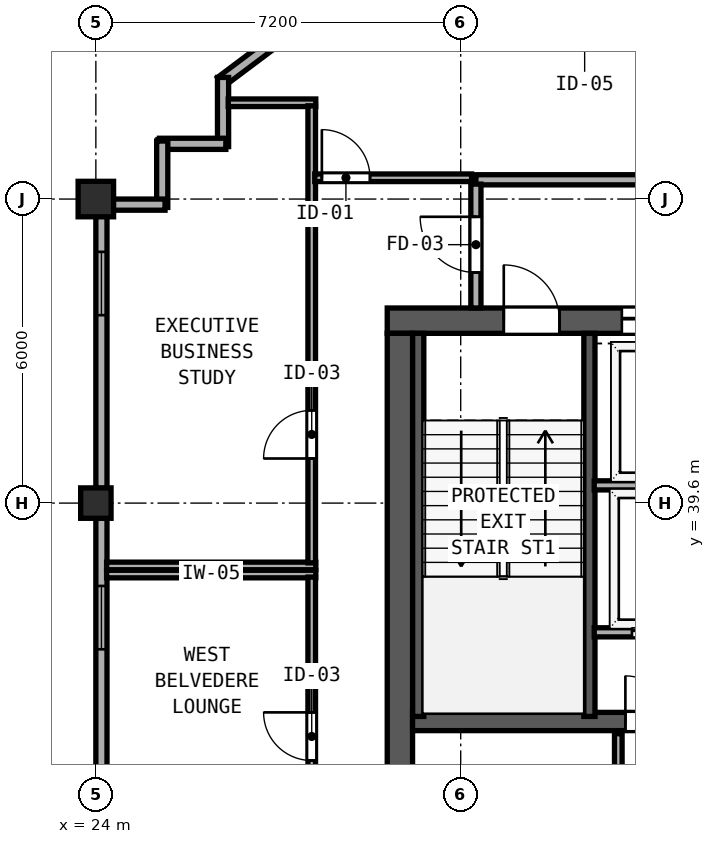
"""IFC4 building model, lengths in metres.
Left out: names, types, materials, properties, quantities, classifications, styles, units other than length and angle.
Written with IfcOpenShell. Run it as: python <this file> out.ifc"""

import sys

from ifc_helpers import new_model, si_unit, direction, frame, frame_2d, origin, origin_2d, place, context, subcontext, project, spatial, rectangle, hollow_rectangle, extrude, element, fill, save


model = new_model("IFC4")
c1 = context("Model", 3, precision=1e-05, world=origin(), true_north=direction((0.0, 1.0)))
c2 = subcontext(c1, "Body", "Model", "MODEL_VIEW")
j1 = project(units=[si_unit("LENGTHUNIT", "METRE"), si_unit("PLANEANGLEUNIT", "RADIAN")], contexts=[c1])
p1 = place(None, origin())
s1 = spatial("IfcSite", under=j1, at=p1, CompositionType="ELEMENT")
p2 = place(p1, origin())
s2 = spatial("IfcBuilding", under=s1, at=p2, CompositionType="ELEMENT")
p3 = place(p2, frame((0.0, 0.0, 301.7)))
s3 = spatial("IfcBuildingStorey", under=s2, at=p3, CompositionType="ELEMENT", Elevation=301.7)
p4 = place(p3, frame((29.75, 43.2, 0.0), z_axis=(0.0, 0.0, 1.0), x_axis=(1.0, 0.0, 0.0)))
e1 = element("IfcWall", 1, at=p4, inside=s3, PredefinedType="SHEAR", context=c2, shape_type="SweptSolid", body=[
    extrude(rectangle(XDim=17.3, YDim=0.5, at=frame_2d((8.65, 0.0))), origin(), (0.0, 0.0, 1.0), 3.72),
])
p5 = place(p4, frame((2.3, 0.0, 0.0)))
e2 = element("IfcOpeningElement", 2, at=p5, cuts=e1, PredefinedType="OPENING", context=c2, shape_type="SweptSolid", body=[
    extrude(rectangle(XDim=1.1, YDim=2.15, at=frame_2d((0.55, 1.075))), frame((0.0, 0.26, 0.0), z_axis=(0.0, -1.0, 0.0), x_axis=(1.0, 0.0, 0.0)), (0.0, 0.0, 1.0), 0.52),
])
p6 = place(p4, frame((7.41, 0.0, 0.0)))
e3 = element("IfcOpeningElement", 3, at=p6, cuts=e1, PredefinedType="OPENING", context=c2, shape_type="SweptSolid", body=[
    extrude(rectangle(XDim=1.1, YDim=2.15, at=frame_2d((0.55, 1.075))), frame((0.0, 0.26, 0.0), z_axis=(0.0, -1.0, 0.0), x_axis=(1.0, 0.0, 0.0)), (0.0, 0.0, 1.0), 0.52),
])
p7 = place(p4, frame((13.5, 0.0, 0.0)))
e4 = element("IfcOpeningElement", 4, at=p7, cuts=e1, PredefinedType="OPENING", context=c2, shape_type="SweptSolid", body=[
    extrude(rectangle(XDim=1.1, YDim=2.15, at=frame_2d((0.55, 1.075))), frame((0.0, 0.26, 0.0), z_axis=(0.0, -1.0, 0.0), x_axis=(1.0, 0.0, 0.0)), (0.0, 0.0, 1.0), 0.52),
])
p8 = place(p4, frame((4.63, 0.0, 0.0)))
e5 = element("IfcOpeningElement", 5, at=p8, cuts=e1, PredefinedType="OPENING", context=c2, shape_type="SweptSolid", body=[
    extrude(rectangle(XDim=1.1, YDim=2.2, at=frame_2d((0.55, 1.1))), frame((0.0, 0.26, 0.0), z_axis=(0.0, -1.0, 0.0), x_axis=(1.0, 0.0, 0.0)), (0.0, 0.0, 1.0), 0.52),
])
p9 = place(p4, frame((10.99, 0.0, 0.0)))
e6 = element("IfcOpeningElement", 6, at=p9, cuts=e1, PredefinedType="OPENING", context=c2, shape_type="SweptSolid", body=[
    extrude(rectangle(XDim=1.1, YDim=2.2, at=frame_2d((0.55, 1.1))), frame((0.0, 0.26, 0.0), z_axis=(0.0, -1.0, 0.0), x_axis=(1.0, 0.0, 0.0)), (0.0, 0.0, 1.0), 0.52),
])
p10 = place(p3, frame((30.0, 32.8, 0.0), z_axis=(0.0, 0.0, 1.0), x_axis=(0.0, 1.0, 0.0)))
e7 = element("IfcWall", 7, at=p10, inside=s3, PredefinedType="SHEAR", context=c2, shape_type="SweptSolid", body=[
    extrude(rectangle(XDim=10.15, YDim=0.5, at=frame_2d((5.075, 0.0))), origin(), (0.0, 0.0, 1.0), 3.72),
])
p11 = place(p3, frame((30.25, 35.29, 0.0), z_axis=(0.0, 0.0, 1.0), x_axis=(1.0, 0.0, 0.0)))
e8 = element("IfcWall", 8, at=p11, inside=s3, PredefinedType="SHEAR", context=c2, shape_type="SweptSolid", body=[
    extrude(rectangle(XDim=16.3, YDim=0.36, at=frame_2d((8.15, 0.0))), origin(), (0.0, 0.0, 1.0), 3.72),
])
p12 = place(p11, frame((5.1, 0.0, 0.0), z_axis=(0.0, 0.0, 1.0), x_axis=(-1.0, 0.0, 0.0)))
e9 = element("IfcOpeningElement", 9, at=p12, cuts=e8, PredefinedType="OPENING", context=c2, shape_type="SweptSolid", body=[
    extrude(rectangle(XDim=0.9, YDim=2.1, at=frame_2d((0.45, 1.05))), frame((0.0, 0.19, 0.0), z_axis=(0.0, -1.0, 0.0), x_axis=(1.0, 0.0, 0.0)), (0.0, 0.0, 1.0), 0.38),
])
p13 = place(p11, frame((12.16, 0.0, 0.0), z_axis=(0.0, 0.0, 1.0), x_axis=(-1.0, 0.0, 0.0)))
e10 = element("IfcOpeningElement", 10, at=p13, cuts=e8, PredefinedType="OPENING", context=c2, shape_type="SweptSolid", body=[
    extrude(rectangle(XDim=0.9, YDim=2.1, at=frame_2d((0.45, 1.05))), frame((0.0, 0.19, 0.0), z_axis=(0.0, -1.0, 0.0), x_axis=(1.0, 0.0, 0.0)), (0.0, 0.0, 1.0), 0.38),
])
for number, where, z_axis, x_axis in (
    (11, (30.362, 35.39, 0.0), (0.0, 0.0, 1.0), (0.0, 1.0, 0.0)),
    (12, (33.74, 35.39, 0.0), (0.0, 0.0, 1.0), (0.0, 1.0, 0.0)),
):
    element("IfcWall", number, at=place(p3, frame(where, z_axis=z_axis, x_axis=x_axis)), inside=s3, PredefinedType="SHEAR", context=c2, shape_type="SweptSolid", body=[
        extrude(rectangle(XDim=7.56, YDim=0.22, at=frame_2d((3.78, 0.0))), origin(), (0.0, 0.0, 1.0), 3.72),
    ])
p14 = place(p3, frame((24.0, 45.6, 0.0), z_axis=(0.0, 0.0, 1.0), x_axis=(1.0, 0.0, 0.0)))
e13 = element("IfcColumn", 13, at=p14, inside=s3, PredefinedType="COLUMN", context=c2, shape_type="SweptSolid", body=[
    extrude(hollow_rectangle(XDim=0.7, YDim=0.7, WallThickness=0.026, at=origin_2d()), origin(), (0.0, 0.0, 1.0), 3.9),
])
p15 = place(p3, frame((24.0, 39.6, 0.0), z_axis=(0.0, 0.0, 1.0), x_axis=(1.0, 0.0, 0.0)))
e14 = element("IfcColumn", 14, at=p15, inside=s3, PredefinedType="COLUMN", context=c2, shape_type="SweptSolid", body=[
    extrude(hollow_rectangle(XDim=0.6, YDim=0.6, WallThickness=0.024, at=origin_2d()), origin(), (0.0, 0.0, 1.0), 3.9),
])
p16 = place(p3, frame((31.289, 51.529, 0.0), z_axis=(0.0, 0.0, 1.0), x_axis=(-0.800014580093, -0.599980559383, 0.0)))
e15 = element("IfcWall", 15, at=p16, inside=s3, PredefinedType="SOLIDWALL", context=c2, shape_type="SweptSolid", body=[
    extrude(rectangle(XDim=6.028, YDim=0.22, at=frame_2d((3.014, 0.0))), origin(), (0.0, 0.0, 1.0), 3.72),
])
p17 = place(p16, frame((0.7, 0.0, 0.85)))
e16 = element("IfcOpeningElement", 16, at=p17, cuts=e15, PredefinedType="OPENING", context=c2, shape_type="SweptSolid", body=[
    extrude(rectangle(XDim=1.25, YDim=1.95, at=frame_2d((0.625, 0.975))), frame((0.0, 0.12, 0.0), z_axis=(0.0, -1.0, 0.0), x_axis=(1.0, 0.0, 0.0)), (0.0, 0.0, 1.0), 0.24),
])
p18 = place(p3, frame((26.51, 48.0, 0.0), z_axis=(0.0, 0.0, 1.0), x_axis=(0.0, -1.0, 0.0)))
e17 = element("IfcWall", 17, at=p18, inside=s3, PredefinedType="SOLIDWALL", context=c2, shape_type="SweptSolid", body=[
    extrude(rectangle(XDim=1.365, YDim=0.22, at=frame_2d((0.683, 0.0))), origin(), (0.0, 0.0, 1.0), 3.72),
])
for number, where, z_axis, x_axis in (
    (18, (26.565, 46.69, 0.0), (0.0, 0.0, 1.0), (-1.0, 0.0, 0.0)),
    (19, (25.31, 46.745, 0.0), (0.0, 0.0, 1.0), (0.0, -1.0, 0.0)),
):
    element("IfcWall", number, at=place(p3, frame(where, z_axis=z_axis, x_axis=x_axis)), inside=s3, PredefinedType="SOLIDWALL", context=c2, shape_type="SweptSolid", body=[
        extrude(rectangle(XDim=1.31, YDim=0.22, at=frame_2d((0.655, 0.0))), origin(), (0.0, 0.0, 1.0), 3.72),
    ])
p19 = place(p3, frame((25.365, 45.49, 0.0), z_axis=(0.0, 0.0, 1.0), x_axis=(-1.0, 0.0, 0.0)))
e20 = element("IfcWall", 20, at=p19, inside=s3, PredefinedType="SOLIDWALL", context=c2, shape_type="SweptSolid", body=[
    extrude(rectangle(XDim=1.023, YDim=0.22, at=frame_2d((0.511, 0.0))), origin(), (0.0, 0.0, 1.0), 3.72),
])
p20 = place(p3, frame((24.11, 45.258, 0.0), z_axis=(0.0, 0.0, 1.0), x_axis=(0.0, -1.0, 0.0)))
e21 = element("IfcWall", 21, at=p20, inside=s3, PredefinedType="SOLIDWALL", context=c2, shape_type="SweptSolid", body=[
    extrude(rectangle(XDim=5.366, YDim=0.22, at=frame_2d((2.683, 0.0))), origin(), (0.0, 0.0, 1.0), 3.365),
])
p21 = place(p20, frame((0.7, 0.0, 0.85)))
e22 = element("IfcOpeningElement", 22, at=p21, cuts=e21, PredefinedType="OPENING", context=c2, shape_type="SweptSolid", body=[
    extrude(rectangle(XDim=1.25, YDim=1.95, at=frame_2d((0.625, 0.975))), frame((0.0, 0.12, 0.0), z_axis=(0.0, -1.0, 0.0), x_axis=(1.0, 0.0, 0.0)), (0.0, 0.0, 1.0), 0.24),
])
p22 = place(p3, frame((24.11, 39.308, 0.0), z_axis=(0.0, 0.0, 1.0), x_axis=(0.0, -1.0, 0.0)))
e23 = element("IfcWall", 23, at=p22, inside=s3, PredefinedType="SOLIDWALL", context=c2, shape_type="SweptSolid", body=[
    extrude(rectangle(XDim=5.366, YDim=0.22, at=frame_2d((2.683, 0.0))), origin(), (0.0, 0.0, 1.0), 3.365),
])
p23 = place(p22, frame((1.343, 0.0, 0.85)))
e24 = element("IfcOpeningElement", 24, at=p23, cuts=e23, PredefinedType="OPENING", context=c2, shape_type="SweptSolid", body=[
    extrude(rectangle(XDim=1.25, YDim=1.95, at=frame_2d((0.625, 0.975))), frame((0.0, 0.12, 0.0), z_axis=(0.0, -1.0, 0.0), x_axis=(1.0, 0.0, 0.0)), (0.0, 0.0, 1.0), 0.24),
])
p24 = place(p3, frame((31.5, 45.98, 0.0), z_axis=(0.0, 0.0, 1.0), x_axis=(1.0, 0.0, 0.0)))
e25 = element("IfcWall", 25, at=p24, inside=s3, PredefinedType="SOLIDWALL", context=c2, shape_type="SweptSolid", body=[
    extrude(rectangle(XDim=13.8, YDim=0.2, at=frame_2d((6.9, 0.0))), origin(), (0.0, 0.0, 1.0), 3.72),
])
p25 = place(p3, frame((31.5, 43.45, 0.0), z_axis=(0.0, 0.0, 1.0), x_axis=(0.0, 1.0, 0.0)))
e26 = element("IfcWall", 26, at=p25, inside=s3, PredefinedType="SOLIDWALL", context=c2, shape_type="SweptSolid", body=[
    extrude(rectangle(XDim=2.445, YDim=0.2, at=frame_2d((1.223, 0.0))), origin(), (0.0, 0.0, 1.0), 3.72),
])
p26 = place(p25, frame((1.8, 0.0, 0.0), z_axis=(0.0, 0.0, 1.0), x_axis=(-1.0, 0.0, 0.0)))
e27 = element("IfcOpeningElement", 27, at=p26, cuts=e26, PredefinedType="OPENING", context=c2, shape_type="SweptSolid", body=[
    extrude(rectangle(XDim=1.1, YDim=2.15, at=frame_2d((0.55, 1.075))), frame((0.0, 0.11, 0.0), z_axis=(0.0, -1.0, 0.0), x_axis=(1.0, 0.0, 0.0)), (0.0, 0.0, 1.0), 0.22),
])
p27 = place(p3, frame((33.835, 39.95, 0.0), z_axis=(0.0, 0.0, 1.0), x_axis=(1.0, 0.0, 0.0)))
e28 = element("IfcWall", 28, at=p27, inside=s3, PredefinedType="SOLIDWALL", context=c2, shape_type="SweptSolid", body=[
    extrude(rectangle(XDim=2.77, YDim=0.18, at=frame_2d((1.385, 0.0))), origin(), (0.0, 0.0, 1.0), 3.72),
])
p28 = place(p3, frame((33.835, 37.05, 0.0), z_axis=(0.0, 0.0, 1.0), x_axis=(1.0, 0.0, 0.0)))
e29 = element("IfcWall", 29, at=p28, inside=s3, PredefinedType="SOLIDWALL", context=c2, shape_type="SweptSolid", body=[
    extrude(rectangle(XDim=2.77, YDim=0.18, at=frame_2d((1.385, 0.0))), origin(), (0.0, 0.0, 1.0), 3.72),
])
p29 = place(p28, frame((1.945, 0.0, 0.0), z_axis=(0.0, 0.0, 1.0), x_axis=(-1.0, 0.0, 0.0)))
e30 = element("IfcOpeningElement", 30, at=p29, cuts=e29, PredefinedType="OPENING", context=c2, shape_type="SweptSolid", body=[
    extrude(rectangle(XDim=1.2, YDim=2.2, at=frame_2d((0.6, 1.1))), frame((0.0, 0.1, 0.0), z_axis=(0.0, -1.0, 0.0), x_axis=(1.0, 0.0, 0.0)), (0.0, 0.0, 1.0), 0.2),
])
p30 = place(p3, frame((34.31, 32.88, 0.0), z_axis=(0.0, 0.0, 1.0), x_axis=(0.0, 1.0, 0.0)))
e31 = element("IfcWall", 31, at=p30, inside=s3, PredefinedType="SOLIDWALL", context=c2, shape_type="SweptSolid", body=[
    extrude(rectangle(XDim=2.17, YDim=0.15, at=frame_2d((1.085, 0.0))), origin(), (0.0, 0.0, 1.0), 3.72),
])
p31 = place(p3, frame((24.212, 38.2, 0.0), z_axis=(0.0, 0.0, 1.0), x_axis=(1.0, 0.0, 0.0)))
e32 = element("IfcWall", 32, at=p31, inside=s3, PredefinedType="PARTITIONING", context=c2, shape_type="SweptSolid", body=[
    extrude(rectangle(XDim=4.128, YDim=0.15, at=frame_2d((2.064, 0.0))), origin(), (0.0, 0.0, 1.0), 3.72),
])
p32 = place(p3, frame((28.26, 33.06, 0.0), z_axis=(0.0, 0.0, 1.0), x_axis=(0.0, 1.0, 0.0)))
e33 = element("IfcWall", 33, at=p32, inside=s3, PredefinedType="PARTITIONING", context=c2, shape_type="SweptSolid", body=[
    extrude(rectangle(XDim=5.08, YDim=0.15, at=frame_2d((2.54, 0.0))), origin(), (0.0, 0.0, 1.0), 3.72),
])
p33 = place(p32, frame((2.41, 0.0, 0.0), z_axis=(0.0, 0.0, 1.0), x_axis=(-1.0, 0.0, 0.0)))
e34 = element("IfcOpeningElement", 34, at=p33, cuts=e33, PredefinedType="OPENING", context=c2, shape_type="SweptSolid", body=[
    extrude(rectangle(XDim=0.95, YDim=2.12, at=frame_2d((0.475, 1.06))), frame((0.0, 0.085, 0.0), z_axis=(0.0, -1.0, 0.0), x_axis=(1.0, 0.0, 0.0)), (0.0, 0.0, 1.0), 0.17),
])
p34 = place(p3, frame((26.612, 47.5, 0.0), z_axis=(0.0, 0.0, 1.0), x_axis=(1.0, 0.0, 0.0)))
e35 = element("IfcWall", 35, at=p34, inside=s3, PredefinedType="PARTITIONING", context=c2, shape_type="SweptSolid", body=[
    extrude(rectangle(XDim=1.728, YDim=0.15, at=frame_2d((0.864, 0.0))), origin(), (0.0, 0.0, 1.0), 3.72),
])
p35 = place(p3, frame((24.212, 38.36, 0.0), z_axis=(0.0, 0.0, 1.0), x_axis=(1.0, 0.0, 0.0)))
e36 = element("IfcWall", 36, at=p35, inside=s3, PredefinedType="PARTITIONING", context=c2, shape_type="SweptSolid", body=[
    extrude(rectangle(XDim=4.128, YDim=0.15, at=frame_2d((2.064, 0.0))), origin(), (0.0, 0.0, 1.0), 3.72),
])
p36 = place(p3, frame((28.26, 38.42, 0.0), z_axis=(0.0, 0.0, 1.0), x_axis=(0.0, 1.0, 0.0)))
e37 = element("IfcWall", 37, at=p36, inside=s3, PredefinedType="PARTITIONING", context=c2, shape_type="SweptSolid", body=[
    extrude(rectangle(XDim=9.02, YDim=0.15, at=frame_2d((4.51, 0.0))), origin(), (0.0, 0.0, 1.0), 3.72),
])
p37 = place(p36, frame((3.01, 0.0, 0.0), z_axis=(0.0, 0.0, 1.0), x_axis=(-1.0, 0.0, 0.0)))
e38 = element("IfcOpeningElement", 38, at=p37, cuts=e37, PredefinedType="OPENING", context=c2, shape_type="SweptSolid", body=[
    extrude(rectangle(XDim=0.95, YDim=2.12, at=frame_2d((0.475, 1.06))), frame((0.0, 0.085, 0.0), z_axis=(0.0, -1.0, 0.0), x_axis=(1.0, 0.0, 0.0)), (0.0, 0.0, 1.0), 0.17),
])
p38 = place(p3, frame((28.32, 46.02, 0.0), z_axis=(0.0, 0.0, 1.0), x_axis=(1.0, 0.0, 0.0)))
e39 = element("IfcWall", 39, at=p38, inside=s3, PredefinedType="PARTITIONING", context=c2, shape_type="SweptSolid", body=[
    extrude(rectangle(XDim=3.095, YDim=0.15, at=frame_2d((1.547, 0.0))), origin(), (0.0, 0.0, 1.0), 3.72),
])
p39 = place(p38, frame((0.14, 0.0, 0.0)))
e40 = element("IfcOpeningElement", 40, at=p39, cuts=e39, PredefinedType="OPENING", context=c2, shape_type="SweptSolid", body=[
    extrude(rectangle(XDim=0.95, YDim=2.18, at=frame_2d((0.475, 1.09))), frame((0.0, 0.085, 0.0), z_axis=(0.0, -1.0, 0.0), x_axis=(1.0, 0.0, 0.0)), (0.0, 0.0, 1.0), 0.17),
])
p40 = place(p21, origin())
e41 = element("IfcWindow", 41, at=p40, inside=s3, PartitioningType="SINGLE_PANEL", PredefinedType="WINDOW", context=c2, shape_type="SweptSolid", body=[
    extrude(rectangle(XDim=1.25, YDim=1.95, at=frame_2d((0.625, 0.975))), frame((0.0, 0.03, 0.0), z_axis=(0.0, -1.0, 0.0), x_axis=(1.0, 0.0, 0.0)), (0.0, 0.0, 1.0), 0.06),
])
fill(e22, e41)
p41 = place(p23, origin())
e42 = element("IfcWindow", 42, at=p41, inside=s3, PartitioningType="SINGLE_PANEL", PredefinedType="WINDOW", context=c2, shape_type="SweptSolid", body=[
    extrude(rectangle(XDim=1.25, YDim=1.95, at=frame_2d((0.625, 0.975))), frame((0.0, 0.03, 0.0), z_axis=(0.0, -1.0, 0.0), x_axis=(1.0, 0.0, 0.0)), (0.0, 0.0, 1.0), 0.06),
])
fill(e24, e42)
p42 = place(p5, origin())
e43 = element("IfcDoor", 43, at=p42, inside=s3, OperationType="SINGLE_SWING_LEFT", PredefinedType="DOOR", context=c2, shape_type="SweptSolid", body=[
    extrude(rectangle(XDim=1.1, YDim=2.15, at=frame_2d((0.55, 1.075))), frame((0.0, 0.185, 0.0), z_axis=(0.0, -1.0, 0.0), x_axis=(1.0, 0.0, 0.0)), (0.0, 0.0, 1.0), 0.05),
])
fill(e2, e43)
p43 = place(p26, origin())
e44 = element("IfcDoor", 44, at=p43, inside=s3, OperationType="SINGLE_SWING_LEFT", PredefinedType="DOOR", context=c2, shape_type="SweptSolid", body=[
    extrude(rectangle(XDim=1.1, YDim=2.15, at=frame_2d((0.55, 1.075))), frame((0.0, 0.025, 0.0), z_axis=(0.0, -1.0, 0.0), x_axis=(1.0, 0.0, 0.0)), (0.0, 0.0, 1.0), 0.05),
])
fill(e27, e44)
p44 = place(p8, origin())
e45 = element("IfcDoor", 45, at=p44, inside=s3, OperationType="SLIDING_TO_LEFT", PredefinedType="DOOR", context=c2, shape_type="SweptSolid", body=[
    extrude(rectangle(XDim=1.1, YDim=2.2, at=frame_2d((0.55, 1.1))), frame((0.0, 0.185, 0.0), z_axis=(0.0, -1.0, 0.0), x_axis=(1.0, 0.0, 0.0)), (0.0, 0.0, 1.0), 0.05),
])
fill(e5, e45)
p45 = place(p29, origin())
e46 = element("IfcDoor", 46, at=p45, inside=s3, OperationType="SLIDING_TO_RIGHT", PredefinedType="DOOR", context=c2, shape_type="SweptSolid", body=[
    extrude(rectangle(XDim=1.2, YDim=2.2, at=frame_2d((0.6, 1.1))), frame((0.0, 0.025, 0.0), z_axis=(0.0, -1.0, 0.0), x_axis=(1.0, 0.0, 0.0)), (0.0, 0.0, 1.0), 0.05),
])
fill(e30, e46)
p46 = place(p12, origin())
e47 = element("IfcDoor", 47, at=p46, inside=s3, OperationType="SINGLE_SWING_RIGHT", PredefinedType="DOOR", context=c2, shape_type="SweptSolid", body=[
    extrude(rectangle(XDim=0.9, YDim=2.1, at=frame_2d((0.45, 1.05))), frame((0.0, 0.025, 0.0), z_axis=(0.0, -1.0, 0.0), x_axis=(1.0, 0.0, 0.0)), (0.0, 0.0, 1.0), 0.05),
])
fill(e9, e47)
p47 = place(p33, origin())
e48 = element("IfcDoor", 48, at=p47, inside=s3, OperationType="SINGLE_SWING_LEFT", PredefinedType="DOOR", context=c2, shape_type="SweptSolid", body=[
    extrude(rectangle(XDim=0.95, YDim=2.12, at=frame_2d((0.475, 1.06))), frame((0.0, 0.025, 0.0), z_axis=(0.0, -1.0, 0.0), x_axis=(1.0, 0.0, 0.0)), (0.0, 0.0, 1.0), 0.05),
])
fill(e34, e48)
p48 = place(p37, origin())
e49 = element("IfcDoor", 49, at=p48, inside=s3, OperationType="SINGLE_SWING_RIGHT", PredefinedType="DOOR", context=c2, shape_type="SweptSolid", body=[
    extrude(rectangle(XDim=0.95, YDim=2.12, at=frame_2d((0.475, 1.06))), frame((0.0, 0.025, 0.0), z_axis=(0.0, -1.0, 0.0), x_axis=(1.0, 0.0, 0.0)), (0.0, 0.0, 1.0), 0.05),
])
fill(e38, e49)
p49 = place(p39, origin())
e50 = element("IfcDoor", 50, at=p49, inside=s3, OperationType="SINGLE_SWING_LEFT", PredefinedType="DOOR", context=c2, shape_type="SweptSolid", body=[
    extrude(rectangle(XDim=0.95, YDim=2.18, at=frame_2d((0.475, 1.09))), frame((0.0, 0.025, 0.0), z_axis=(0.0, -1.0, 0.0), x_axis=(1.0, 0.0, 0.0)), (0.0, 0.0, 1.0), 0.05),
])
fill(e40, e50)
save(model, sys.argv[1])
